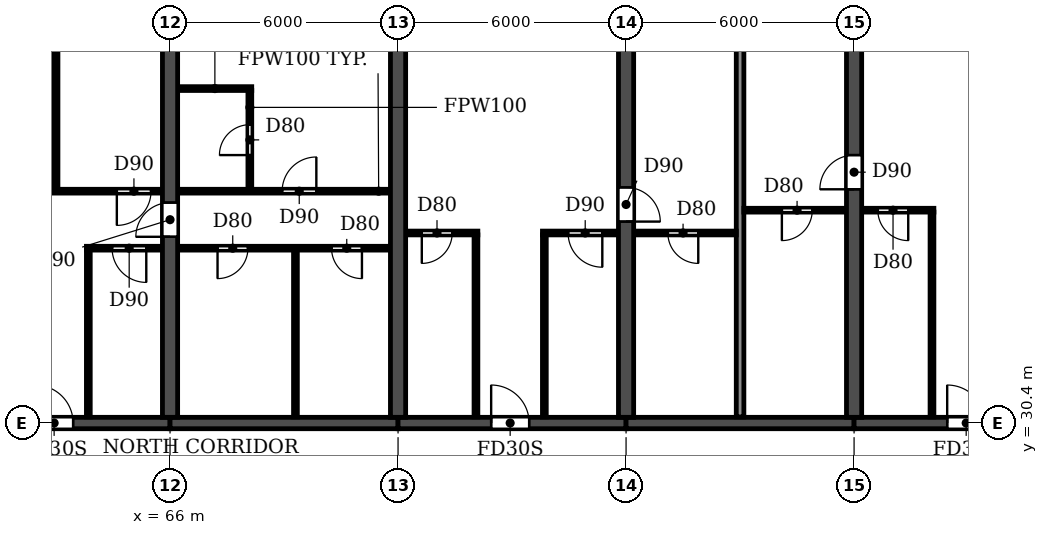
"""IFC4 building model, lengths in metres.
Left out: names, types, materials, properties, quantities, classifications, styles, units other than length and angle.
Written with IfcOpenShell. Run it as: python <this file> out.ifc"""

import sys

from ifc_helpers import new_model, si_unit, direction, frame, frame_2d, origin, place, context, subcontext, project, spatial, rectangle, extrude, element, fill, save


model = new_model("IFC4")
c1 = context("Model", 3, precision=1e-05, world=origin(), true_north=direction((0.0, 1.0)))
c2 = subcontext(c1, "Body", "Model", "MODEL_VIEW")
j1 = project(units=[si_unit("LENGTHUNIT", "METRE"), si_unit("PLANEANGLEUNIT", "RADIAN")], contexts=[c1])
p1 = place(None, origin())
s1 = spatial("IfcSite", under=j1, at=p1, CompositionType="ELEMENT")
p2 = place(p1, origin())
s2 = spatial("IfcBuilding", under=s1, at=p2, CompositionType="ELEMENT")
p3 = place(p2, frame((0.0, 0.0, 26.7)))
s3 = spatial("IfcBuildingStorey", under=s2, at=p3, CompositionType="ELEMENT", Elevation=26.7)
p4 = place(p3, frame((66.0, 30.55, 0.0), z_axis=(0.0, 0.0, 1.0), x_axis=(0.0, 1.0, 0.0)))
e1 = element("IfcWall", 1, at=p4, inside=s3, PredefinedType="SHEAR", context=c2, shape_type="SweptSolid", body=[
    extrude(rectangle(XDim=14.05, YDim=0.4, at=frame_2d((7.025, 0.0))), origin(), (0.0, 0.0, 1.0), 3.05),
])
p5 = place(p4, frame((4.75, 0.0, 0.0)))
e2 = element("IfcOpeningElement", 2, at=p5, cuts=e1, PredefinedType="OPENING", context=c2, shape_type="SweptSolid", body=[
    extrude(rectangle(XDim=0.9, YDim=2.1, at=frame_2d((0.45, 1.05))), frame((0.0, 0.21, 0.0), z_axis=(0.0, -1.0, 0.0), x_axis=(1.0, 0.0, 0.0)), (0.0, 0.0, 1.0), 0.42),
])
p6 = place(p3, frame((72.0, 30.55, 0.0), z_axis=(0.0, 0.0, 1.0), x_axis=(0.0, 1.0, 0.0)))
e3 = element("IfcWall", 3, at=p6, inside=s3, PredefinedType="SHEAR", context=c2, shape_type="SweptSolid", body=[
    extrude(rectangle(XDim=14.05, YDim=0.4, at=frame_2d((7.025, 0.0))), origin(), (0.0, 0.0, 1.0), 3.05),
])
p7 = place(p3, frame((78.0, 30.55, 0.0), z_axis=(0.0, 0.0, 1.0), x_axis=(0.0, 1.0, 0.0)))
e4 = element("IfcWall", 4, at=p7, inside=s3, PredefinedType="SHEAR", context=c2, shape_type="SweptSolid", body=[
    extrude(rectangle(XDim=14.05, YDim=0.4, at=frame_2d((7.025, 0.0))), origin(), (0.0, 0.0, 1.0), 3.05),
])
p8 = place(p7, frame((5.15, 0.0, 0.0)))
e5 = element("IfcOpeningElement", 5, at=p8, cuts=e4, PredefinedType="OPENING", context=c2, shape_type="SweptSolid", body=[
    extrude(rectangle(XDim=0.9, YDim=2.1, at=frame_2d((0.45, 1.05))), frame((0.0, 0.21, 0.0), z_axis=(0.0, -1.0, 0.0), x_axis=(1.0, 0.0, 0.0)), (0.0, 0.0, 1.0), 0.42),
])
p9 = place(p3, frame((84.0, 30.55, 0.0), z_axis=(0.0, 0.0, 1.0), x_axis=(0.0, 1.0, 0.0)))
e6 = element("IfcWall", 6, at=p9, inside=s3, PredefinedType="SHEAR", context=c2, shape_type="SweptSolid", body=[
    extrude(rectangle(XDim=14.05, YDim=0.4, at=frame_2d((7.025, 0.0))), origin(), (0.0, 0.0, 1.0), 3.05),
])
p10 = place(p9, frame((6.0, 0.0, 0.0)))
e7 = element("IfcOpeningElement", 7, at=p10, cuts=e6, PredefinedType="OPENING", context=c2, shape_type="SweptSolid", body=[
    extrude(rectangle(XDim=0.9, YDim=2.1, at=frame_2d((0.45, 1.05))), frame((0.0, 0.21, 0.0), z_axis=(0.0, -1.0, 0.0), x_axis=(1.0, 0.0, 0.0)), (0.0, 0.0, 1.0), 0.42),
])
p11 = place(p3, frame((60.0, 30.4, 0.0), z_axis=(0.0, 0.0, 1.0), x_axis=(1.0, 0.0, 0.0)))
e8 = element("IfcWall", 8, at=p11, inside=s3, PredefinedType="SHEAR", context=c2, shape_type="SweptSolid", body=[
    extrude(rectangle(XDim=6.0, YDim=0.3, at=frame_2d((3.0, 0.0))), origin(), (0.0, 0.0, 1.0), 2.45),
])
p12 = place(p11, frame((2.45, 0.0, 0.0)))
e9 = element("IfcOpeningElement", 9, at=p12, cuts=e8, PredefinedType="OPENING", context=c2, shape_type="SweptSolid", body=[
    extrude(rectangle(XDim=1.0, YDim=2.1, at=frame_2d((0.5, 1.05))), frame((0.0, 0.16, 0.0), z_axis=(0.0, -1.0, 0.0), x_axis=(1.0, 0.0, 0.0)), (0.0, 0.0, 1.0), 0.32),
])
p13 = place(p3, frame((66.0, 30.4, 0.0), z_axis=(0.0, 0.0, 1.0), x_axis=(1.0, 0.0, 0.0)))
e10 = element("IfcWall", 10, at=p13, inside=s3, PredefinedType="SHEAR", context=c2, shape_type="SweptSolid", body=[
    extrude(rectangle(XDim=6.0, YDim=0.3, at=frame_2d((3.0, 0.0))), origin(), (0.0, 0.0, 1.0), 2.45),
])
p14 = place(p3, frame((72.0, 30.4, 0.0), z_axis=(0.0, 0.0, 1.0), x_axis=(1.0, 0.0, 0.0)))
e11 = element("IfcWall", 11, at=p14, inside=s3, PredefinedType="SHEAR", context=c2, shape_type="SweptSolid", body=[
    extrude(rectangle(XDim=6.0, YDim=0.3, at=frame_2d((3.0, 0.0))), origin(), (0.0, 0.0, 1.0), 2.45),
])
p15 = place(p14, frame((2.45, 0.0, 0.0)))
e12 = element("IfcOpeningElement", 12, at=p15, cuts=e11, PredefinedType="OPENING", context=c2, shape_type="SweptSolid", body=[
    extrude(rectangle(XDim=1.0, YDim=2.1, at=frame_2d((0.5, 1.05))), frame((0.0, 0.16, 0.0), z_axis=(0.0, -1.0, 0.0), x_axis=(1.0, 0.0, 0.0)), (0.0, 0.0, 1.0), 0.32),
])
p16 = place(p3, frame((78.0, 30.4, 0.0), z_axis=(0.0, 0.0, 1.0), x_axis=(1.0, 0.0, 0.0)))
e13 = element("IfcWall", 13, at=p16, inside=s3, PredefinedType="SHEAR", context=c2, shape_type="SweptSolid", body=[
    extrude(rectangle(XDim=6.0, YDim=0.3, at=frame_2d((3.0, 0.0))), origin(), (0.0, 0.0, 1.0), 2.45),
])
p17 = place(p3, frame((84.0, 30.4, 0.0), z_axis=(0.0, 0.0, 1.0), x_axis=(1.0, 0.0, 0.0)))
e14 = element("IfcWall", 14, at=p17, inside=s3, PredefinedType="SHEAR", context=c2, shape_type="SweptSolid", body=[
    extrude(rectangle(XDim=6.0, YDim=0.3, at=frame_2d((3.0, 0.0))), origin(), (0.0, 0.0, 1.0), 2.45),
])
p18 = place(p17, frame((2.45, 0.0, 0.0)))
e15 = element("IfcOpeningElement", 15, at=p18, cuts=e14, PredefinedType="OPENING", context=c2, shape_type="SweptSolid", body=[
    extrude(rectangle(XDim=1.0, YDim=2.1, at=frame_2d((0.5, 1.05))), frame((0.0, 0.16, 0.0), z_axis=(0.0, -1.0, 0.0), x_axis=(1.0, 0.0, 0.0)), (0.0, 0.0, 1.0), 0.32),
])
p19 = place(p3, frame((81.0, 30.56, 0.0), z_axis=(0.0, 0.0, 1.0), x_axis=(0.0, 1.0, 0.0)))
e16 = element("IfcWall", 16, at=p19, inside=s3, PredefinedType="PARTITIONING", context=c2, shape_type="SweptSolid", body=[
    extrude(rectangle(XDim=14.18, YDim=0.2, at=frame_2d((7.09, 0.0))), origin(), (0.0, 0.0, 1.0), 3.05),
])
p20 = place(p3, frame((63.8, 35.0, 0.0), z_axis=(0.0, 0.0, 1.0), x_axis=(1.0, 0.0, 0.0)))
e17 = element("IfcWall", 17, at=p20, inside=s3, PredefinedType="PARTITIONING", context=c2, shape_type="SweptSolid", body=[
    extrude(rectangle(XDim=1.99, YDim=0.1, at=frame_2d((0.995, 0.0))), origin(), (0.0, 0.0, 1.0), 3.05),
])
p21 = place(p20, frame((0.675, 0.0, 0.0)))
e18 = element("IfcOpeningElement", 18, at=p21, cuts=e17, PredefinedType="OPENING", context=c2, shape_type="SweptSolid", body=[
    extrude(rectangle(XDim=0.9, YDim=2.1, at=frame_2d((0.45, 1.05))), frame((0.0, 0.06, 0.0), z_axis=(0.0, -1.0, 0.0), x_axis=(1.0, 0.0, 0.0)), (0.0, 0.0, 1.0), 0.12),
])
p22 = place(p3, frame((66.21, 35.0, 0.0), z_axis=(0.0, 0.0, 1.0), x_axis=(1.0, 0.0, 0.0)))
e19 = element("IfcWall", 19, at=p22, inside=s3, PredefinedType="PARTITIONING", context=c2, shape_type="SweptSolid", body=[
    extrude(rectangle(XDim=5.58, YDim=0.1, at=frame_2d((2.79, 0.0))), origin(), (0.0, 0.0, 1.0), 3.05),
])
p23 = place(p22, frame((1.04, 0.0, 0.0)))
e20 = element("IfcOpeningElement", 20, at=p23, cuts=e19, PredefinedType="OPENING", context=c2, shape_type="SweptSolid", body=[
    extrude(rectangle(XDim=0.8, YDim=2.1, at=frame_2d((0.4, 1.05))), frame((0.0, 0.06, 0.0), z_axis=(0.0, -1.0, 0.0), x_axis=(1.0, 0.0, 0.0)), (0.0, 0.0, 1.0), 0.12),
])
p24 = place(p22, frame((4.04, 0.0, 0.0)))
e21 = element("IfcOpeningElement", 21, at=p24, cuts=e19, PredefinedType="OPENING", context=c2, shape_type="SweptSolid", body=[
    extrude(rectangle(XDim=0.8, YDim=2.1, at=frame_2d((0.4, 1.05))), frame((0.0, 0.06, 0.0), z_axis=(0.0, -1.0, 0.0), x_axis=(1.0, 0.0, 0.0)), (0.0, 0.0, 1.0), 0.12),
])
p25 = place(p3, frame((72.21, 35.4, 0.0), z_axis=(0.0, 0.0, 1.0), x_axis=(1.0, 0.0, 0.0)))
e22 = element("IfcWall", 22, at=p25, inside=s3, PredefinedType="PARTITIONING", context=c2, shape_type="SweptSolid", body=[
    extrude(rectangle(XDim=1.89, YDim=0.1, at=frame_2d((0.945, 0.0))), origin(), (0.0, 0.0, 1.0), 3.05),
])
p26 = place(p25, frame((0.415, 0.0, 0.0)))
e23 = element("IfcOpeningElement", 23, at=p26, cuts=e22, PredefinedType="OPENING", context=c2, shape_type="SweptSolid", body=[
    extrude(rectangle(XDim=0.8, YDim=2.1, at=frame_2d((0.4, 1.05))), frame((0.0, 0.06, 0.0), z_axis=(0.0, -1.0, 0.0), x_axis=(1.0, 0.0, 0.0)), (0.0, 0.0, 1.0), 0.12),
])
p27 = place(p3, frame((75.8, 35.4, 0.0), z_axis=(0.0, 0.0, 1.0), x_axis=(1.0, 0.0, 0.0)))
e24 = element("IfcWall", 24, at=p27, inside=s3, PredefinedType="PARTITIONING", context=c2, shape_type="SweptSolid", body=[
    extrude(rectangle(XDim=1.99, YDim=0.1, at=frame_2d((0.995, 0.0))), origin(), (0.0, 0.0, 1.0), 3.05),
])
p28 = place(p27, frame((0.675, 0.0, 0.0)))
e25 = element("IfcOpeningElement", 25, at=p28, cuts=e24, PredefinedType="OPENING", context=c2, shape_type="SweptSolid", body=[
    extrude(rectangle(XDim=0.9, YDim=2.1, at=frame_2d((0.45, 1.05))), frame((0.0, 0.06, 0.0), z_axis=(0.0, -1.0, 0.0), x_axis=(1.0, 0.0, 0.0)), (0.0, 0.0, 1.0), 0.12),
])
p29 = place(p3, frame((78.21, 35.4, 0.0), z_axis=(0.0, 0.0, 1.0), x_axis=(1.0, 0.0, 0.0)))
e26 = element("IfcWall", 26, at=p29, inside=s3, PredefinedType="PARTITIONING", context=c2, shape_type="SweptSolid", body=[
    extrude(rectangle(XDim=2.69, YDim=0.1, at=frame_2d((1.345, 0.0))), origin(), (0.0, 0.0, 1.0), 3.05),
])
p30 = place(p29, frame((0.89, 0.0, 0.0)))
e27 = element("IfcOpeningElement", 27, at=p30, cuts=e26, PredefinedType="OPENING", context=c2, shape_type="SweptSolid", body=[
    extrude(rectangle(XDim=0.8, YDim=2.1, at=frame_2d((0.4, 1.05))), frame((0.0, 0.06, 0.0), z_axis=(0.0, -1.0, 0.0), x_axis=(1.0, 0.0, 0.0)), (0.0, 0.0, 1.0), 0.12),
])
p31 = place(p3, frame((81.1, 36.0, 0.0), z_axis=(0.0, 0.0, 1.0), x_axis=(1.0, 0.0, 0.0)))
e28 = element("IfcWall", 28, at=p31, inside=s3, PredefinedType="PARTITIONING", context=c2, shape_type="SweptSolid", body=[
    extrude(rectangle(XDim=2.69, YDim=0.1, at=frame_2d((1.345, 0.0))), origin(), (0.0, 0.0, 1.0), 3.05),
])
p32 = place(p31, frame((1.0, 0.0, 0.0)))
e29 = element("IfcOpeningElement", 29, at=p32, cuts=e28, PredefinedType="OPENING", context=c2, shape_type="SweptSolid", body=[
    extrude(rectangle(XDim=0.8, YDim=2.1, at=frame_2d((0.4, 1.05))), frame((0.0, 0.06, 0.0), z_axis=(0.0, -1.0, 0.0), x_axis=(1.0, 0.0, 0.0)), (0.0, 0.0, 1.0), 0.12),
])
p33 = place(p3, frame((84.21, 36.0, 0.0), z_axis=(0.0, 0.0, 1.0), x_axis=(1.0, 0.0, 0.0)))
e30 = element("IfcWall", 30, at=p33, inside=s3, PredefinedType="PARTITIONING", context=c2, shape_type="SweptSolid", body=[
    extrude(rectangle(XDim=1.89, YDim=0.1, at=frame_2d((0.945, 0.0))), origin(), (0.0, 0.0, 1.0), 3.05),
])
p34 = place(p33, frame((0.415, 0.0, 0.0)))
e31 = element("IfcOpeningElement", 31, at=p34, cuts=e30, PredefinedType="OPENING", context=c2, shape_type="SweptSolid", body=[
    extrude(rectangle(XDim=0.8, YDim=2.1, at=frame_2d((0.4, 1.05))), frame((0.0, 0.06, 0.0), z_axis=(0.0, -1.0, 0.0), x_axis=(1.0, 0.0, 0.0)), (0.0, 0.0, 1.0), 0.12),
])
p35 = place(p3, frame((62.95, 36.5, 0.0), z_axis=(0.0, 0.0, 1.0), x_axis=(1.0, 0.0, 0.0)))
e32 = element("IfcWall", 32, at=p35, inside=s3, PredefinedType="PARTITIONING", context=c2, shape_type="SweptSolid", body=[
    extrude(rectangle(XDim=2.84, YDim=0.1, at=frame_2d((1.42, 0.0))), origin(), (0.0, 0.0, 1.0), 3.05),
])
p36 = place(p35, frame((1.65, 0.0, 0.0)))
e33 = element("IfcOpeningElement", 33, at=p36, cuts=e32, PredefinedType="OPENING", context=c2, shape_type="SweptSolid", body=[
    extrude(rectangle(XDim=0.9, YDim=2.1, at=frame_2d((0.45, 1.05))), frame((0.0, 0.06, 0.0), z_axis=(0.0, -1.0, 0.0), x_axis=(1.0, 0.0, 0.0)), (0.0, 0.0, 1.0), 0.12),
])
p37 = place(p3, frame((66.21, 36.5, 0.0), z_axis=(0.0, 0.0, 1.0), x_axis=(1.0, 0.0, 0.0)))
e34 = element("IfcWall", 34, at=p37, inside=s3, PredefinedType="PARTITIONING", context=c2, shape_type="SweptSolid", body=[
    extrude(rectangle(XDim=5.58, YDim=0.1, at=frame_2d((2.79, 0.0))), origin(), (0.0, 0.0, 1.0), 3.05),
])
p38 = place(p37, frame((2.74, 0.0, 0.0)))
e35 = element("IfcOpeningElement", 35, at=p38, cuts=e34, PredefinedType="OPENING", context=c2, shape_type="SweptSolid", body=[
    extrude(rectangle(XDim=0.9, YDim=2.1, at=frame_2d((0.45, 1.05))), frame((0.0, 0.06, 0.0), z_axis=(0.0, -1.0, 0.0), x_axis=(1.0, 0.0, 0.0)), (0.0, 0.0, 1.0), 0.12),
])
p39 = place(p3, frame((66.21, 39.2, 0.0), z_axis=(0.0, 0.0, 1.0), x_axis=(1.0, 0.0, 0.0)))
e36 = element("IfcWall", 36, at=p39, inside=s3, PredefinedType="PARTITIONING", context=c2, shape_type="SweptSolid", body=[
    extrude(rectangle(XDim=1.94, YDim=0.1, at=frame_2d((0.97, 0.0))), origin(), (0.0, 0.0, 1.0), 3.05),
])
p40 = place(p3, frame((63.0, 36.55, 0.0), z_axis=(0.0, 0.0, 1.0), x_axis=(0.0, 1.0, 0.0)))
e37 = element("IfcWall", 37, at=p40, inside=s3, PredefinedType="PARTITIONING", context=c2, shape_type="SweptSolid", body=[
    extrude(rectangle(XDim=8.19, YDim=0.1, at=frame_2d((4.095, 0.0))), origin(), (0.0, 0.0, 1.0), 3.05),
])
p41 = place(p3, frame((63.85, 30.56, 0.0), z_axis=(0.0, 0.0, 1.0), x_axis=(0.0, 1.0, 0.0)))
e38 = element("IfcWall", 38, at=p41, inside=s3, PredefinedType="PARTITIONING", context=c2, shape_type="SweptSolid", body=[
    extrude(rectangle(XDim=4.39, YDim=0.1, at=frame_2d((2.195, 0.0))), origin(), (0.0, 0.0, 1.0), 3.05),
])
p42 = place(p3, frame((68.1, 36.55, 0.0), z_axis=(0.0, 0.0, 1.0), x_axis=(0.0, 1.0, 0.0)))
e39 = element("IfcWall", 39, at=p42, inside=s3, PredefinedType="PARTITIONING", context=c2, shape_type="SweptSolid", body=[
    extrude(rectangle(XDim=2.6, YDim=0.1, at=frame_2d((1.3, 0.0))), origin(), (0.0, 0.0, 1.0), 3.05),
])
p43 = place(p42, frame((0.9, 0.0, 0.0)))
e40 = element("IfcOpeningElement", 40, at=p43, cuts=e39, PredefinedType="OPENING", context=c2, shape_type="SweptSolid", body=[
    extrude(rectangle(XDim=0.8, YDim=2.1, at=frame_2d((0.4, 1.05))), frame((0.0, 0.06, 0.0), z_axis=(0.0, -1.0, 0.0), x_axis=(1.0, 0.0, 0.0)), (0.0, 0.0, 1.0), 0.12),
])
p44 = place(p3, frame((69.3, 30.56, 0.0), z_axis=(0.0, 0.0, 1.0), x_axis=(0.0, 1.0, 0.0)))
e41 = element("IfcWall", 41, at=p44, inside=s3, PredefinedType="PARTITIONING", context=c2, shape_type="SweptSolid", body=[
    extrude(rectangle(XDim=4.39, YDim=0.1, at=frame_2d((2.195, 0.0))), origin(), (0.0, 0.0, 1.0), 3.05),
])
for number, where, z_axis, x_axis in (
    (42, (74.05, 30.56, 0.0), (0.0, 0.0, 1.0), (0.0, 1.0, 0.0)),
    (43, (75.85, 30.56, 0.0), (0.0, 0.0, 1.0), (0.0, 1.0, 0.0)),
):
    element("IfcWall", number, at=place(p3, frame(where, z_axis=z_axis, x_axis=x_axis)), inside=s3, PredefinedType="PARTITIONING", context=c2, shape_type="SweptSolid", body=[
        extrude(rectangle(XDim=4.79, YDim=0.1, at=frame_2d((2.395, 0.0))), origin(), (0.0, 0.0, 1.0), 3.05),
    ])
p45 = place(p3, frame((86.05, 30.56, 0.0), z_axis=(0.0, 0.0, 1.0), x_axis=(0.0, 1.0, 0.0)))
e44 = element("IfcWall", 44, at=p45, inside=s3, PredefinedType="PARTITIONING", context=c2, shape_type="SweptSolid", body=[
    extrude(rectangle(XDim=5.39, YDim=0.1, at=frame_2d((2.695, 0.0))), origin(), (0.0, 0.0, 1.0), 3.05),
])
p46 = place(p23, frame((0.8, 0.0, 0.0), z_axis=(0.0, 0.0, 1.0), x_axis=(-1.0, 0.0, 0.0)))
e45 = element("IfcDoor", 45, at=p46, inside=s3, OperationType="SINGLE_SWING_RIGHT", PredefinedType="DOOR", context=c2, shape_type="SweptSolid", body=[
    extrude(rectangle(XDim=0.8, YDim=2.1, at=frame_2d((0.4, 1.05))), frame((0.0, 0.025, 0.0), z_axis=(0.0, -1.0, 0.0), x_axis=(1.0, 0.0, 0.0)), (0.0, 0.0, 1.0), 0.05),
])
fill(e20, e45)
p47 = place(p38, origin())
e46 = element("IfcDoor", 46, at=p47, inside=s3, OperationType="SINGLE_SWING_RIGHT", PredefinedType="DOOR", context=c2, shape_type="SweptSolid", body=[
    extrude(rectangle(XDim=0.9, YDim=2.1, at=frame_2d((0.45, 1.05))), frame((0.0, 0.025, 0.0), z_axis=(0.0, -1.0, 0.0), x_axis=(1.0, 0.0, 0.0)), (0.0, 0.0, 1.0), 0.05),
])
fill(e35, e46)
p48 = place(p24, frame((0.8, 0.0, 0.0), z_axis=(0.0, 0.0, 1.0), x_axis=(-1.0, 0.0, 0.0)))
e47 = element("IfcDoor", 47, at=p48, inside=s3, OperationType="SINGLE_SWING_LEFT", PredefinedType="DOOR", context=c2, shape_type="SweptSolid", body=[
    extrude(rectangle(XDim=0.8, YDim=2.1, at=frame_2d((0.4, 1.05))), frame((0.0, 0.025, 0.0), z_axis=(0.0, -1.0, 0.0), x_axis=(1.0, 0.0, 0.0)), (0.0, 0.0, 1.0), 0.05),
])
fill(e21, e47)
p49 = place(p12, origin())
e48 = element("IfcDoor", 48, at=p49, inside=s3, OperationType="SINGLE_SWING_LEFT", PredefinedType="DOOR", context=c2, shape_type="SweptSolid", body=[
    extrude(rectangle(XDim=1.0, YDim=2.1, at=frame_2d((0.5, 1.05))), frame((0.0, 0.025, 0.0), z_axis=(0.0, -1.0, 0.0), x_axis=(1.0, 0.0, 0.0)), (0.0, 0.0, 1.0), 0.05),
])
fill(e9, e48)
p50 = place(p21, frame((0.9, 0.0, 0.0), z_axis=(0.0, 0.0, 1.0), x_axis=(-1.0, 0.0, 0.0)))
e49 = element("IfcDoor", 49, at=p50, inside=s3, OperationType="SINGLE_SWING_LEFT", PredefinedType="DOOR", context=c2, shape_type="SweptSolid", body=[
    extrude(rectangle(XDim=0.9, YDim=2.1, at=frame_2d((0.45, 1.05))), frame((0.0, 0.025, 0.0), z_axis=(0.0, -1.0, 0.0), x_axis=(1.0, 0.0, 0.0)), (0.0, 0.0, 1.0), 0.05),
])
fill(e18, e49)
p51 = place(p36, frame((0.9, 0.0, 0.0), z_axis=(0.0, 0.0, 1.0), x_axis=(-1.0, 0.0, 0.0)))
e50 = element("IfcDoor", 50, at=p51, inside=s3, OperationType="SINGLE_SWING_RIGHT", PredefinedType="DOOR", context=c2, shape_type="SweptSolid", body=[
    extrude(rectangle(XDim=0.9, YDim=2.1, at=frame_2d((0.45, 1.05))), frame((0.0, 0.025, 0.0), z_axis=(0.0, -1.0, 0.0), x_axis=(1.0, 0.0, 0.0)), (0.0, 0.0, 1.0), 0.05),
])
fill(e33, e50)
p52 = place(p5, origin())
e51 = element("IfcDoor", 51, at=p52, inside=s3, OperationType="SINGLE_SWING_LEFT", PredefinedType="DOOR", context=c2, shape_type="SweptSolid", body=[
    extrude(rectangle(XDim=0.9, YDim=2.1, at=frame_2d((0.45, 1.05))), frame((0.0, 0.025, 0.0), z_axis=(0.0, -1.0, 0.0), x_axis=(1.0, 0.0, 0.0)), (0.0, 0.0, 1.0), 0.05),
])
fill(e2, e51)
p53 = place(p43, origin())
e52 = element("IfcDoor", 52, at=p53, inside=s3, OperationType="SINGLE_SWING_LEFT", PredefinedType="DOOR", context=c2, shape_type="SweptSolid", body=[
    extrude(rectangle(XDim=0.8, YDim=2.1, at=frame_2d((0.4, 1.05))), frame((0.0, 0.025, 0.0), z_axis=(0.0, -1.0, 0.0), x_axis=(1.0, 0.0, 0.0)), (0.0, 0.0, 1.0), 0.05),
])
fill(e40, e52)
p54 = place(p30, frame((0.8, 0.0, 0.0), z_axis=(0.0, 0.0, 1.0), x_axis=(-1.0, 0.0, 0.0)))
e53 = element("IfcDoor", 53, at=p54, inside=s3, OperationType="SINGLE_SWING_LEFT", PredefinedType="DOOR", context=c2, shape_type="SweptSolid", body=[
    extrude(rectangle(XDim=0.8, YDim=2.1, at=frame_2d((0.4, 1.05))), frame((0.0, 0.025, 0.0), z_axis=(0.0, -1.0, 0.0), x_axis=(1.0, 0.0, 0.0)), (0.0, 0.0, 1.0), 0.05),
])
fill(e27, e53)
p55 = place(p26, frame((0.8, 0.0, 0.0), z_axis=(0.0, 0.0, 1.0), x_axis=(-1.0, 0.0, 0.0)))
e54 = element("IfcDoor", 54, at=p55, inside=s3, OperationType="SINGLE_SWING_RIGHT", PredefinedType="DOOR", context=c2, shape_type="SweptSolid", body=[
    extrude(rectangle(XDim=0.8, YDim=2.1, at=frame_2d((0.4, 1.05))), frame((0.0, 0.025, 0.0), z_axis=(0.0, -1.0, 0.0), x_axis=(1.0, 0.0, 0.0)), (0.0, 0.0, 1.0), 0.05),
])
fill(e23, e54)
p56 = place(p15, origin())
e55 = element("IfcDoor", 55, at=p56, inside=s3, OperationType="SINGLE_SWING_LEFT", PredefinedType="DOOR", context=c2, shape_type="SweptSolid", body=[
    extrude(rectangle(XDim=1.0, YDim=2.1, at=frame_2d((0.5, 1.05))), frame((0.0, 0.025, 0.0), z_axis=(0.0, -1.0, 0.0), x_axis=(1.0, 0.0, 0.0)), (0.0, 0.0, 1.0), 0.05),
])
fill(e12, e55)
p57 = place(p28, frame((0.9, 0.0, 0.0), z_axis=(0.0, 0.0, 1.0), x_axis=(-1.0, 0.0, 0.0)))
e56 = element("IfcDoor", 56, at=p57, inside=s3, OperationType="SINGLE_SWING_LEFT", PredefinedType="DOOR", context=c2, shape_type="SweptSolid", body=[
    extrude(rectangle(XDim=0.9, YDim=2.1, at=frame_2d((0.45, 1.05))), frame((0.0, 0.025, 0.0), z_axis=(0.0, -1.0, 0.0), x_axis=(1.0, 0.0, 0.0)), (0.0, 0.0, 1.0), 0.05),
])
fill(e25, e56)
p58 = place(p8, frame((0.9, 0.0, 0.0), z_axis=(0.0, 0.0, 1.0), x_axis=(-1.0, 0.0, 0.0)))
e57 = element("IfcDoor", 57, at=p58, inside=s3, OperationType="SINGLE_SWING_RIGHT", PredefinedType="DOOR", context=c2, shape_type="SweptSolid", body=[
    extrude(rectangle(XDim=0.9, YDim=2.1, at=frame_2d((0.45, 1.05))), frame((0.0, 0.025, 0.0), z_axis=(0.0, -1.0, 0.0), x_axis=(1.0, 0.0, 0.0)), (0.0, 0.0, 1.0), 0.05),
])
fill(e5, e57)
p59 = place(p32, frame((0.8, 0.0, 0.0), z_axis=(0.0, 0.0, 1.0), x_axis=(-1.0, 0.0, 0.0)))
e58 = element("IfcDoor", 58, at=p59, inside=s3, OperationType="SINGLE_SWING_RIGHT", PredefinedType="DOOR", context=c2, shape_type="SweptSolid", body=[
    extrude(rectangle(XDim=0.8, YDim=2.1, at=frame_2d((0.4, 1.05))), frame((0.0, 0.025, 0.0), z_axis=(0.0, -1.0, 0.0), x_axis=(1.0, 0.0, 0.0)), (0.0, 0.0, 1.0), 0.05),
])
fill(e29, e58)
p60 = place(p10, origin())
e59 = element("IfcDoor", 59, at=p60, inside=s3, OperationType="SINGLE_SWING_LEFT", PredefinedType="DOOR", context=c2, shape_type="SweptSolid", body=[
    extrude(rectangle(XDim=0.9, YDim=2.1, at=frame_2d((0.45, 1.05))), frame((0.0, 0.025, 0.0), z_axis=(0.0, -1.0, 0.0), x_axis=(1.0, 0.0, 0.0)), (0.0, 0.0, 1.0), 0.05),
])
fill(e7, e59)
p61 = place(p34, frame((0.8, 0.0, 0.0), z_axis=(0.0, 0.0, 1.0), x_axis=(-1.0, 0.0, 0.0)))
e60 = element("IfcDoor", 60, at=p61, inside=s3, OperationType="SINGLE_SWING_LEFT", PredefinedType="DOOR", context=c2, shape_type="SweptSolid", body=[
    extrude(rectangle(XDim=0.8, YDim=2.1, at=frame_2d((0.4, 1.05))), frame((0.0, 0.025, 0.0), z_axis=(0.0, -1.0, 0.0), x_axis=(1.0, 0.0, 0.0)), (0.0, 0.0, 1.0), 0.05),
])
fill(e31, e60)
p62 = place(p18, origin())
e61 = element("IfcDoor", 61, at=p62, inside=s3, OperationType="SINGLE_SWING_LEFT", PredefinedType="DOOR", context=c2, shape_type="SweptSolid", body=[
    extrude(rectangle(XDim=1.0, YDim=2.1, at=frame_2d((0.5, 1.05))), frame((0.0, 0.025, 0.0), z_axis=(0.0, -1.0, 0.0), x_axis=(1.0, 0.0, 0.0)), (0.0, 0.0, 1.0), 0.05),
])
fill(e15, e61)
save(model, sys.argv[1])
